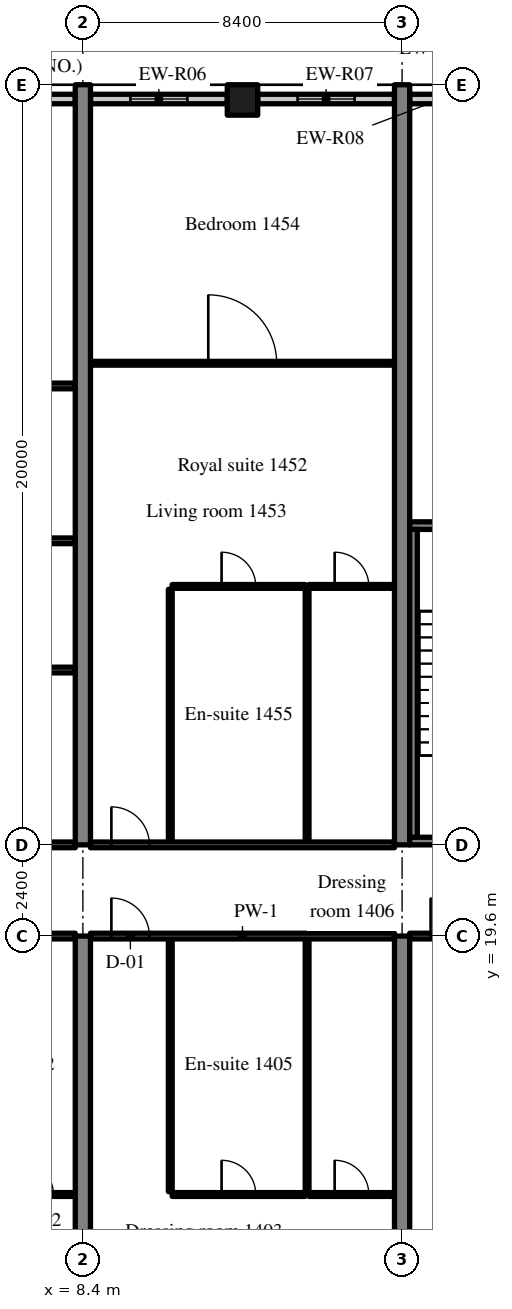
"""IFC4 building model, lengths in metres.
Left out: names, types, materials, properties, quantities, classifications, styles, units other than length and angle.
Written with IfcOpenShell. Run it as: python <this file> out.ifc"""

import sys

from ifc_helpers import new_model, si_unit, direction, frame, frame_2d, origin, origin_2d, place, context, subcontext, project, spatial, rectangle, extrude, source, transform, mapped, element, fill, save


model = new_model("IFC4")
c1 = context("Model", 3, precision=1e-05, world=origin(), true_north=direction((0.0, 1.0)))
c2 = subcontext(c1, "Body", "Model", "MODEL_VIEW")
j1 = project(units=[si_unit("LENGTHUNIT", "METRE"), si_unit("PLANEANGLEUNIT", "RADIAN")], contexts=[c1])
p1 = place(None, origin())
s1 = spatial("IfcSite", under=j1, at=p1, CompositionType="ELEMENT")
p2 = place(p1, origin())
s2 = spatial("IfcBuilding", under=s1, at=p2, CompositionType="ELEMENT")
p3 = place(p2, frame((0.0, 0.0, 62.0)))
s3 = spatial("IfcBuildingStorey", under=s2, at=p3, CompositionType="ELEMENT", Elevation=62.0)
m1 = source(origin(), c2, "Body", "SweptSolid", [
    extrude(rectangle(XDim=19.6, YDim=0.4, at=frame_2d((9.8, 0.0))), origin(), (0.0, 0.0, 1.0), 3.52),
])
p4 = place(p3, frame((8.4, 0.0, 0.0), z_axis=(0.0, 0.0, 1.0), x_axis=(0.0, 1.0, 0.0)))
e1 = element("IfcWall", 1, at=p4, inside=s3, PredefinedType="SHEAR", context=c2, shape_type="MappedRepresentation", body=[
    mapped(m1, transform((0.0, 0.0, 0.0), scale=1.0)),
])
m2 = source(origin(), c2, "Body", "SweptSolid", [
    extrude(rectangle(XDim=20.0, YDim=0.4, at=frame_2d((10.0, 0.0))), origin(), (0.0, 0.0, 1.0), 3.52),
])
p5 = place(p3, frame((8.4, 22.0, 0.0), z_axis=(0.0, 0.0, 1.0), x_axis=(0.0, 1.0, 0.0)))
e2 = element("IfcWall", 2, at=p5, inside=s3, PredefinedType="SHEAR", context=c2, shape_type="MappedRepresentation", body=[
    mapped(m2, transform((0.0, 0.0, 0.0), scale=1.0)),
])
p6 = place(p3, frame((16.8, 0.0, 0.0), z_axis=(0.0, 0.0, 1.0), x_axis=(0.0, 1.0, 0.0)))
e3 = element("IfcWall", 3, at=p6, inside=s3, PredefinedType="SHEAR", context=c2, shape_type="MappedRepresentation", body=[
    mapped(m1, transform((0.0, 0.0, 0.0), scale=1.0)),
])
p7 = place(p3, frame((16.8, 22.0, 0.0), z_axis=(0.0, 0.0, 1.0), x_axis=(0.0, 1.0, 0.0)))
e4 = element("IfcWall", 4, at=p7, inside=s3, PredefinedType="SHEAR", context=c2, shape_type="MappedRepresentation", body=[
    mapped(m2, transform((0.0, 0.0, 0.0), scale=1.0)),
])
m3 = source(origin(), c2, "Body", "SweptSolid", [
    extrude(rectangle(XDim=0.8, YDim=0.8, at=origin_2d()), origin(), (0.0, 0.0, 1.0), 3.52),
])
p8 = place(p3, frame((12.6, 41.6, 0.0), z_axis=(0.0, 0.0, 1.0), x_axis=(1.0, 0.0, 0.0)))
e5 = element("IfcColumn", 5, at=p8, inside=s3, PredefinedType="COLUMN", context=c2, shape_type="MappedRepresentation", body=[
    mapped(m3, transform((0.0, 0.0, 0.0), scale=1.0)),
])
m4 = source(origin(), c2, "Body", "SweptSolid", [
    extrude(rectangle(XDim=4.045, YDim=0.25, at=frame_2d((2.022, 0.0))), origin(), (0.0, 0.0, 1.0), 2.82),
])
p9 = place(p3, frame((8.2, 41.625, 0.0), z_axis=(0.0, 0.0, 1.0), x_axis=(-1.0, 0.0, 0.0)))
e6 = element("IfcWall", 6, at=p9, inside=s3, PredefinedType="SOLIDWALL", context=c2, shape_type="MappedRepresentation", body=[
    mapped(m4, transform((0.0, 0.0, 0.0), scale=1.0)),
])
m5 = source(origin(), c2, "Body", "SweptSolid", [
    extrude(rectangle(XDim=1.5, YDim=1.5, at=frame_2d((0.75, 0.75))), frame((0.0, 0.135, 0.0), z_axis=(0.0, -1.0, 0.0), x_axis=(1.0, 0.0, 0.0)), (0.0, 0.0, 1.0), 0.27),
])
p10 = place(p9, frame((1.272, 0.0, 0.9)))
e7 = element("IfcOpeningElement", 7, at=p10, cuts=e6, PredefinedType="OPENING", context=c2, shape_type="MappedRepresentation", body=[
    mapped(m5, transform((0.0, 0.0, 0.0), scale=1.0)),
])
m6 = source(origin(), c2, "Body", "SweptSolid", [
    extrude(rectangle(XDim=3.6, YDim=0.25, at=frame_2d((1.8, 0.0))), origin(), (0.0, 0.0, 1.0), 2.82),
])
p11 = place(p3, frame((12.2, 41.625, 0.0), z_axis=(0.0, 0.0, 1.0), x_axis=(-1.0, 0.0, 0.0)))
e8 = element("IfcWall", 8, at=p11, inside=s3, PredefinedType="SOLIDWALL", context=c2, shape_type="MappedRepresentation", body=[
    mapped(m6, transform((0.0, 0.0, 0.0), scale=1.0)),
])
p12 = place(p11, frame((1.05, 0.0, 0.9)))
e9 = element("IfcOpeningElement", 9, at=p12, cuts=e8, PredefinedType="OPENING", context=c2, shape_type="MappedRepresentation", body=[
    mapped(m5, transform((0.0, 0.0, 0.0), scale=1.0)),
])
m7 = source(origin(), c2, "Body", "SweptSolid", [
    extrude(rectangle(XDim=3.6, YDim=0.25, at=frame_2d((1.8, 0.0))), origin(), (0.0, 0.0, 1.0), 2.82),
])
p13 = place(p3, frame((16.6, 41.625, 0.0), z_axis=(0.0, 0.0, 1.0), x_axis=(-1.0, 0.0, 0.0)))
e10 = element("IfcWall", 10, at=p13, inside=s3, PredefinedType="SOLIDWALL", context=c2, shape_type="MappedRepresentation", body=[
    mapped(m7, transform((0.0, 0.0, 0.0), scale=1.0)),
])
p14 = place(p13, frame((1.05, 0.0, 0.9)))
e11 = element("IfcOpeningElement", 11, at=p14, cuts=e10, PredefinedType="OPENING", context=c2, shape_type="MappedRepresentation", body=[
    mapped(m5, transform((0.0, 0.0, 0.0), scale=1.0)),
])
m8 = source(origin(), c2, "Body", "SweptSolid", [
    extrude(rectangle(XDim=1.658, YDim=0.25, at=frame_2d((0.829, 0.0))), origin(), (0.0, 0.0, 1.0), 2.82),
])
p15 = place(p3, frame((18.658, 41.625, 0.0), z_axis=(0.0, 0.0, 1.0), x_axis=(-1.0, 0.0, 0.0)))
e12 = element("IfcWall", 12, at=p15, inside=s3, PredefinedType="SOLIDWALL", context=c2, shape_type="MappedRepresentation", body=[
    mapped(m8, transform((0.0, 0.0, 0.0), scale=1.0)),
])
m9 = source(origin(), c2, "Body", "SweptSolid", [
    extrude(rectangle(XDim=8.2, YDim=0.2, at=frame_2d((4.1, 0.0))), origin(), (0.0, 0.0, 1.0), 3.52),
])
p16 = place(p3, frame((17.0, 22.1, 0.0), z_axis=(0.0, 0.0, 1.0), x_axis=(1.0, 0.0, 0.0)))
e13 = element("IfcWall", 13, at=p16, inside=s3, PredefinedType="SOLIDWALL", context=c2, shape_type="MappedRepresentation", body=[
    mapped(m9, transform((0.0, 0.0, 0.0), scale=1.0)),
])
m10 = source(origin(), c2, "Body", "SweptSolid", [
    extrude(rectangle(XDim=1.2, YDim=2.1, at=frame_2d((0.6, 1.05))), frame((0.0, 0.11, 0.0), z_axis=(0.0, -1.0, 0.0), x_axis=(1.0, 0.0, 0.0)), (0.0, 0.0, 1.0), 0.22),
])
p17 = place(p16, frame((6.0, 0.0, 0.0)))
e14 = element("IfcOpeningElement", 14, at=p17, cuts=e13, PredefinedType="OPENING", context=c2, shape_type="MappedRepresentation", body=[
    mapped(m10, transform((0.0, 0.0, 0.0), scale=1.0)),
])
p18 = place(p3, frame((17.0, 30.4, 0.0), z_axis=(0.0, 0.0, 1.0), x_axis=(1.0, 0.0, 0.0)))
e15 = element("IfcWall", 15, at=p18, inside=s3, PredefinedType="SOLIDWALL", context=c2, shape_type="MappedRepresentation", body=[
    mapped(m9, transform((0.0, 0.0, 0.0), scale=1.0)),
])
m11 = source(origin(), c2, "Body", "SweptSolid", [
    extrude(rectangle(XDim=1.0, YDim=2.1, at=frame_2d((0.5, 1.05))), frame((0.0, 0.11, 0.0), z_axis=(0.0, -1.0, 0.0), x_axis=(1.0, 0.0, 0.0)), (0.0, 0.0, 1.0), 0.22),
])
p19 = place(p18, frame((6.1, 0.0, 0.0)))
e16 = element("IfcOpeningElement", 16, at=p19, cuts=e15, PredefinedType="OPENING", context=c2, shape_type="MappedRepresentation", body=[
    mapped(m11, transform((0.0, 0.0, 0.0), scale=1.0)),
])
m12 = source(origin(), c2, "Body", "SweptSolid", [
    extrude(rectangle(XDim=8.1, YDim=0.2, at=frame_2d((4.05, 0.0))), origin(), (0.0, 0.0, 1.0), 3.52),
])
p20 = place(p3, frame((17.1, 22.2, 0.0), z_axis=(0.0, 0.0, 1.0), x_axis=(0.0, 1.0, 0.0)))
e17 = element("IfcWall", 17, at=p20, inside=s3, PredefinedType="SOLIDWALL", context=c2, shape_type="MappedRepresentation", body=[
    mapped(m12, transform((0.0, 0.0, 0.0), scale=1.0)),
])
m13 = source(origin(), c2, "Body", "SweptSolid", [
    extrude(rectangle(XDim=2.05, YDim=0.1, at=frame_2d((1.025, 0.0))), origin(), (0.0, 0.0, 1.0), 3.52),
])
p21 = place(p3, frame((6.15, 12.8, 0.0), z_axis=(0.0, 0.0, 1.0), x_axis=(1.0, 0.0, 0.0)))
e18 = element("IfcWall", 18, at=p21, inside=s3, PredefinedType="PARTITIONING", context=c2, shape_type="MappedRepresentation", body=[
    mapped(m13, transform((0.0, 0.0, 0.0), scale=1.0)),
])
m14 = source(origin(), c2, "Body", "SweptSolid", [
    extrude(rectangle(XDim=0.9, YDim=2.1, at=frame_2d((0.45, 1.05))), frame((0.0, 0.06, 0.0), z_axis=(0.0, -1.0, 0.0), x_axis=(1.0, 0.0, 0.0)), (0.0, 0.0, 1.0), 0.12),
])
p22 = place(p21, frame((0.575, 0.0, 0.0)))
e19 = element("IfcOpeningElement", 19, at=p22, cuts=e18, PredefinedType="OPENING", context=c2, shape_type="MappedRepresentation", body=[
    mapped(m14, transform((0.0, 0.0, 0.0), scale=1.0)),
])
m15 = source(origin(), c2, "Body", "SweptSolid", [
    extrude(rectangle(XDim=7.8, YDim=0.15, at=frame_2d((3.9, 0.0))), origin(), (0.0, 0.0, 1.0), 2.82),
])
p23 = place(p3, frame((0.4, 19.6, 0.0), z_axis=(0.0, 0.0, 1.0), x_axis=(1.0, 0.0, 0.0)))
e20 = element("IfcWall", 20, at=p23, inside=s3, PredefinedType="PARTITIONING", context=c2, shape_type="MappedRepresentation", body=[
    mapped(m15, transform((0.0, 0.0, 0.0), scale=1.0)),
])
m16 = source(origin(), c2, "Body", "SweptSolid", [
    extrude(rectangle(XDim=1.0, YDim=2.1, at=frame_2d((0.5, 1.05))), frame((0.0, 0.085, 0.0), z_axis=(0.0, -1.0, 0.0), x_axis=(1.0, 0.0, 0.0)), (0.0, 0.0, 1.0), 0.17),
])
p24 = place(p23, frame((0.55, 0.0, 0.0)))
e21 = element("IfcOpeningElement", 21, at=p24, cuts=e20, PredefinedType="OPENING", context=c2, shape_type="MappedRepresentation", body=[
    mapped(m16, transform((0.0, 0.0, 0.0), scale=1.0)),
])
m17 = source(origin(), c2, "Body", "SweptSolid", [
    extrude(rectangle(XDim=6.65, YDim=0.1, at=frame_2d((3.325, 0.0))), origin(), (0.0, 0.0, 1.0), 3.52),
])
for number, where, z_axis, x_axis in (
    (22, (10.7, 12.875, 0.0), (0.0, 0.0, 1.0), (0.0, 1.0, 0.0)),
    (23, (14.3, 12.875, 0.0), (0.0, 0.0, 1.0), (0.0, 1.0, 0.0)),
):
    element("IfcWall", number, at=place(p3, frame(where, z_axis=z_axis, x_axis=x_axis)), inside=s3, PredefinedType="PARTITIONING", context=c2, shape_type="MappedRepresentation", body=[
        mapped(m17, transform((0.0, 0.0, 0.0), scale=1.0)),
    ])
m18 = source(origin(), c2, "Body", "SweptSolid", [
    extrude(rectangle(XDim=3.5, YDim=0.1, at=frame_2d((1.75, 0.0))), origin(), (0.0, 0.0, 1.0), 3.52),
])
p25 = place(p3, frame((10.75, 12.8, 0.0), z_axis=(0.0, 0.0, 1.0), x_axis=(1.0, 0.0, 0.0)))
e24 = element("IfcWall", 24, at=p25, inside=s3, PredefinedType="PARTITIONING", context=c2, shape_type="MappedRepresentation", body=[
    mapped(m18, transform((0.0, 0.0, 0.0), scale=1.0)),
])
p26 = place(p25, frame((1.3, 0.0, 0.0)))
e25 = element("IfcOpeningElement", 25, at=p26, cuts=e24, PredefinedType="OPENING", context=c2, shape_type="MappedRepresentation", body=[
    mapped(m14, transform((0.0, 0.0, 0.0), scale=1.0)),
])
m19 = source(origin(), c2, "Body", "SweptSolid", [
    extrude(rectangle(XDim=2.25, YDim=0.1, at=frame_2d((1.125, 0.0))), origin(), (0.0, 0.0, 1.0), 3.52),
])
p27 = place(p3, frame((14.35, 12.8, 0.0), z_axis=(0.0, 0.0, 1.0), x_axis=(1.0, 0.0, 0.0)))
e26 = element("IfcWall", 26, at=p27, inside=s3, PredefinedType="PARTITIONING", context=c2, shape_type="MappedRepresentation", body=[
    mapped(m19, transform((0.0, 0.0, 0.0), scale=1.0)),
])
p28 = place(p27, frame((0.675, 0.0, 0.0)))
e27 = element("IfcOpeningElement", 27, at=p28, cuts=e26, PredefinedType="OPENING", context=c2, shape_type="MappedRepresentation", body=[
    mapped(m14, transform((0.0, 0.0, 0.0), scale=1.0)),
])
m20 = source(origin(), c2, "Body", "SweptSolid", [
    extrude(rectangle(XDim=8.0, YDim=0.15, at=frame_2d((4.0, 0.0))), origin(), (0.0, 0.0, 1.0), 2.82),
])
p29 = place(p3, frame((8.6, 19.6, 0.0), z_axis=(0.0, 0.0, 1.0), x_axis=(1.0, 0.0, 0.0)))
e28 = element("IfcWall", 28, at=p29, inside=s3, PredefinedType="PARTITIONING", context=c2, shape_type="MappedRepresentation", body=[
    mapped(m20, transform((0.0, 0.0, 0.0), scale=1.0)),
])
p30 = place(p29, frame((0.55, 0.0, 0.0)))
e29 = element("IfcOpeningElement", 29, at=p30, cuts=e28, PredefinedType="OPENING", context=c2, shape_type="MappedRepresentation", body=[
    mapped(m16, transform((0.0, 0.0, 0.0), scale=1.0)),
])
m21 = source(origin(), c2, "Body", "SweptSolid", [
    extrude(rectangle(XDim=3.925, YDim=0.15, at=frame_2d((1.962, 0.0))), origin(), (0.0, 0.0, 1.0), 2.82),
])
p31 = place(p3, frame((17.0, 19.6, 0.0), z_axis=(0.0, 0.0, 1.0), x_axis=(1.0, 0.0, 0.0)))
e30 = element("IfcWall", 30, at=p31, inside=s3, PredefinedType="PARTITIONING", context=c2, shape_type="MappedRepresentation", body=[
    mapped(m21, transform((0.0, 0.0, 0.0), scale=1.0)),
])
p32 = place(p31, frame((0.55, 0.0, 0.0)))
e31 = element("IfcOpeningElement", 31, at=p32, cuts=e30, PredefinedType="OPENING", context=c2, shape_type="MappedRepresentation", body=[
    mapped(m16, transform((0.0, 0.0, 0.0), scale=1.0)),
])
m22 = source(origin(), c2, "Body", "SweptSolid", [
    extrude(rectangle(XDim=5.25, YDim=0.15, at=frame_2d((2.625, 0.0))), origin(), (0.0, 0.0, 1.0), 2.82),
])
p33 = place(p3, frame((2.95, 22.0, 0.0), z_axis=(0.0, 0.0, 1.0), x_axis=(1.0, 0.0, 0.0)))
e32 = element("IfcWall", 32, at=p33, inside=s3, PredefinedType="PARTITIONING", context=c2, shape_type="MappedRepresentation", body=[
    mapped(m22, transform((0.0, 0.0, 0.0), scale=1.0)),
])
m23 = source(origin(), c2, "Body", "SweptSolid", [
    extrude(rectangle(XDim=5.25, YDim=0.15, at=frame_2d((2.625, 0.0))), origin(), (0.0, 0.0, 1.0), 3.52),
])
for number, where, z_axis, x_axis in (
    (33, (2.95, 26.6, 0.0), (0.0, 0.0, 1.0), (1.0, 0.0, 0.0)),
    (34, (2.95, 30.0, 0.0), (0.0, 0.0, 1.0), (1.0, 0.0, 0.0)),
):
    element("IfcWall", number, at=place(p3, frame(where, z_axis=z_axis, x_axis=x_axis)), inside=s3, PredefinedType="PARTITIONING", context=c2, shape_type="MappedRepresentation", body=[
        mapped(m23, transform((0.0, 0.0, 0.0), scale=1.0)),
    ])
m24 = source(origin(), c2, "Body", "SweptSolid", [
    extrude(rectangle(XDim=7.8, YDim=0.15, at=frame_2d((3.9, 0.0))), origin(), (0.0, 0.0, 1.0), 3.52),
])
p34 = place(p3, frame((0.4, 34.075, 0.0), z_axis=(0.0, 0.0, 1.0), x_axis=(1.0, 0.0, 0.0)))
e35 = element("IfcWall", 35, at=p34, inside=s3, PredefinedType="PARTITIONING", context=c2, shape_type="MappedRepresentation", body=[
    mapped(m24, transform((0.0, 0.0, 0.0), scale=1.0)),
])
p35 = place(p34, frame((0.7, 0.0, 0.0)))
e36 = element("IfcOpeningElement", 36, at=p35, cuts=e35, PredefinedType="OPENING", context=c2, shape_type="MappedRepresentation", body=[
    mapped(m16, transform((0.0, 0.0, 0.0), scale=1.0)),
])
m25 = source(origin(), c2, "Body", "SweptSolid", [
    extrude(rectangle(XDim=6.65, YDim=0.1, at=frame_2d((3.325, 0.0))), origin(), (0.0, 0.0, 1.0), 3.52),
])
for number, where, z_axis, x_axis in (
    (37, (10.7, 22.075, 0.0), (0.0, 0.0, 1.0), (0.0, 1.0, 0.0)),
    (38, (14.3, 22.075, 0.0), (0.0, 0.0, 1.0), (0.0, 1.0, 0.0)),
):
    element("IfcWall", number, at=place(p3, frame(where, z_axis=z_axis, x_axis=x_axis)), inside=s3, PredefinedType="PARTITIONING", context=c2, shape_type="MappedRepresentation", body=[
        mapped(m25, transform((0.0, 0.0, 0.0), scale=1.0)),
    ])
p36 = place(p3, frame((10.75, 28.8, 0.0), z_axis=(0.0, 0.0, 1.0), x_axis=(1.0, 0.0, 0.0)))
e39 = element("IfcWall", 39, at=p36, inside=s3, PredefinedType="PARTITIONING", context=c2, shape_type="MappedRepresentation", body=[
    mapped(m18, transform((0.0, 0.0, 0.0), scale=1.0)),
])
p37 = place(p36, frame((1.3, 0.0, 0.0)))
e40 = element("IfcOpeningElement", 40, at=p37, cuts=e39, PredefinedType="OPENING", context=c2, shape_type="MappedRepresentation", body=[
    mapped(m14, transform((0.0, 0.0, 0.0), scale=1.0)),
])
p38 = place(p3, frame((14.35, 28.8, 0.0), z_axis=(0.0, 0.0, 1.0), x_axis=(1.0, 0.0, 0.0)))
e41 = element("IfcWall", 41, at=p38, inside=s3, PredefinedType="PARTITIONING", context=c2, shape_type="MappedRepresentation", body=[
    mapped(m19, transform((0.0, 0.0, 0.0), scale=1.0)),
])
p39 = place(p38, frame((0.675, 0.0, 0.0)))
e42 = element("IfcOpeningElement", 42, at=p39, cuts=e41, PredefinedType="OPENING", context=c2, shape_type="MappedRepresentation", body=[
    mapped(m14, transform((0.0, 0.0, 0.0), scale=1.0)),
])
m26 = source(origin(), c2, "Body", "SweptSolid", [
    extrude(rectangle(XDim=8.0, YDim=0.1, at=frame_2d((4.0, 0.0))), origin(), (0.0, 0.0, 1.0), 3.52),
])
p40 = place(p3, frame((8.6, 34.672, 0.0), z_axis=(0.0, 0.0, 1.0), x_axis=(1.0, 0.0, 0.0)))
e43 = element("IfcWall", 43, at=p40, inside=s3, PredefinedType="PARTITIONING", context=c2, shape_type="MappedRepresentation", body=[
    mapped(m26, transform((0.0, 0.0, 0.0), scale=1.0)),
])
m27 = source(origin(), c2, "Body", "SweptSolid", [
    extrude(rectangle(XDim=1.8, YDim=2.1, at=frame_2d((0.9, 1.05))), frame((0.0, 0.06, 0.0), z_axis=(0.0, -1.0, 0.0), x_axis=(1.0, 0.0, 0.0)), (0.0, 0.0, 1.0), 0.12),
])
p41 = place(p40, frame((3.1, 0.0, 0.0)))
e44 = element("IfcOpeningElement", 44, at=p41, cuts=e43, PredefinedType="OPENING", context=c2, shape_type="MappedRepresentation", body=[
    mapped(m27, transform((0.0, 0.0, 0.0), scale=1.0)),
])
p42 = place(p3, frame((8.6, 22.0, 0.0), z_axis=(0.0, 0.0, 1.0), x_axis=(1.0, 0.0, 0.0)))
e45 = element("IfcWall", 45, at=p42, inside=s3, PredefinedType="PARTITIONING", context=c2, shape_type="MappedRepresentation", body=[
    mapped(m20, transform((0.0, 0.0, 0.0), scale=1.0)),
])
p43 = place(p42, frame((0.55, 0.0, 0.0)))
e46 = element("IfcOpeningElement", 46, at=p43, cuts=e45, PredefinedType="OPENING", context=c2, shape_type="MappedRepresentation", body=[
    mapped(m16, transform((0.0, 0.0, 0.0), scale=1.0)),
])
m28 = source(origin(), c2, "Body", "SweptSolid", [
    extrude(rectangle(XDim=1.5, YDim=1.5, at=frame_2d((0.75, 0.75))), frame((0.0, 0.03, 0.0), z_axis=(0.0, -1.0, 0.0), x_axis=(1.0, 0.0, 0.0)), (0.0, 0.0, 1.0), 0.06),
])
p44 = place(p12, origin())
e47 = element("IfcWindow", 47, at=p44, inside=s3, PartitioningType="SINGLE_PANEL", PredefinedType="WINDOW", context=c2, shape_type="MappedRepresentation", body=[
    mapped(m28, transform((0.0, 0.0, 0.0), scale=1.0)),
])
fill(e9, e47)
p45 = place(p14, origin())
e48 = element("IfcWindow", 48, at=p45, inside=s3, PartitioningType="SINGLE_PANEL", PredefinedType="WINDOW", context=c2, shape_type="MappedRepresentation", body=[
    mapped(m28, transform((0.0, 0.0, 0.0), scale=1.0)),
])
fill(e11, e48)
m29 = source(origin(), c2, "Body", "SweptSolid", [
    extrude(rectangle(XDim=0.9, YDim=2.1, at=frame_2d((0.45, 1.05))), frame((0.0, 0.025, 0.0), z_axis=(0.0, -1.0, 0.0), x_axis=(1.0, 0.0, 0.0)), (0.0, 0.0, 1.0), 0.05),
])
p46 = place(p22, origin())
e49 = element("IfcDoor", 49, at=p46, inside=s3, OperationType="SINGLE_SWING_LEFT", PredefinedType="DOOR", context=c2, shape_type="MappedRepresentation", body=[
    mapped(m29, transform((0.0, 0.0, 0.0), scale=1.0)),
])
fill(e19, e49)
p47 = place(p26, origin())
e50 = element("IfcDoor", 50, at=p47, inside=s3, OperationType="SINGLE_SWING_LEFT", PredefinedType="DOOR", context=c2, shape_type="MappedRepresentation", body=[
    mapped(m29, transform((0.0, 0.0, 0.0), scale=1.0)),
])
fill(e25, e50)
p48 = place(p28, origin())
e51 = element("IfcDoor", 51, at=p48, inside=s3, OperationType="SINGLE_SWING_LEFT", PredefinedType="DOOR", context=c2, shape_type="MappedRepresentation", body=[
    mapped(m29, transform((0.0, 0.0, 0.0), scale=1.0)),
])
fill(e27, e51)
m30 = source(origin(), c2, "Body", "SweptSolid", [
    extrude(rectangle(XDim=1.0, YDim=2.1, at=frame_2d((0.5, 1.05))), frame((0.0, 0.025, 0.0), z_axis=(0.0, -1.0, 0.0), x_axis=(1.0, 0.0, 0.0)), (0.0, 0.0, 1.0), 0.05),
])
p49 = place(p30, origin())
e52 = element("IfcDoor", 52, at=p49, inside=s3, OperationType="SINGLE_SWING_LEFT", PredefinedType="DOOR", context=c2, shape_type="MappedRepresentation", body=[
    mapped(m30, transform((0.0, 0.0, 0.0), scale=1.0)),
])
fill(e29, e52)
p50 = place(p32, origin())
e53 = element("IfcDoor", 53, at=p50, inside=s3, OperationType="SINGLE_SWING_LEFT", PredefinedType="DOOR", context=c2, shape_type="MappedRepresentation", body=[
    mapped(m30, transform((0.0, 0.0, 0.0), scale=1.0)),
])
fill(e31, e53)
p51 = place(p37, origin())
e54 = element("IfcDoor", 54, at=p51, inside=s3, OperationType="SINGLE_SWING_LEFT", PredefinedType="DOOR", context=c2, shape_type="MappedRepresentation", body=[
    mapped(m29, transform((0.0, 0.0, 0.0), scale=1.0)),
])
fill(e40, e54)
p52 = place(p39, origin())
e55 = element("IfcDoor", 55, at=p52, inside=s3, OperationType="SINGLE_SWING_LEFT", PredefinedType="DOOR", context=c2, shape_type="MappedRepresentation", body=[
    mapped(m29, transform((0.0, 0.0, 0.0), scale=1.0)),
])
fill(e42, e55)
m31 = source(origin(), c2, "Body", "SweptSolid", [
    extrude(rectangle(XDim=1.8, YDim=2.1, at=frame_2d((0.9, 1.05))), frame((0.0, 0.025, 0.0), z_axis=(0.0, -1.0, 0.0), x_axis=(1.0, 0.0, 0.0)), (0.0, 0.0, 1.0), 0.05),
])
p53 = place(p41, origin())
e56 = element("IfcDoor", 56, at=p53, inside=s3, OperationType="DOUBLE_DOOR_SINGLE_SWING", PredefinedType="DOOR", context=c2, shape_type="MappedRepresentation", body=[
    mapped(m31, transform((0.0, 0.0, 0.0), scale=1.0)),
])
fill(e44, e56)
p54 = place(p43, origin())
e57 = element("IfcDoor", 57, at=p54, inside=s3, OperationType="SINGLE_SWING_LEFT", PredefinedType="DOOR", context=c2, shape_type="MappedRepresentation", body=[
    mapped(m30, transform((0.0, 0.0, 0.0), scale=1.0)),
])
fill(e46, e57)
save(model, sys.argv[1])
